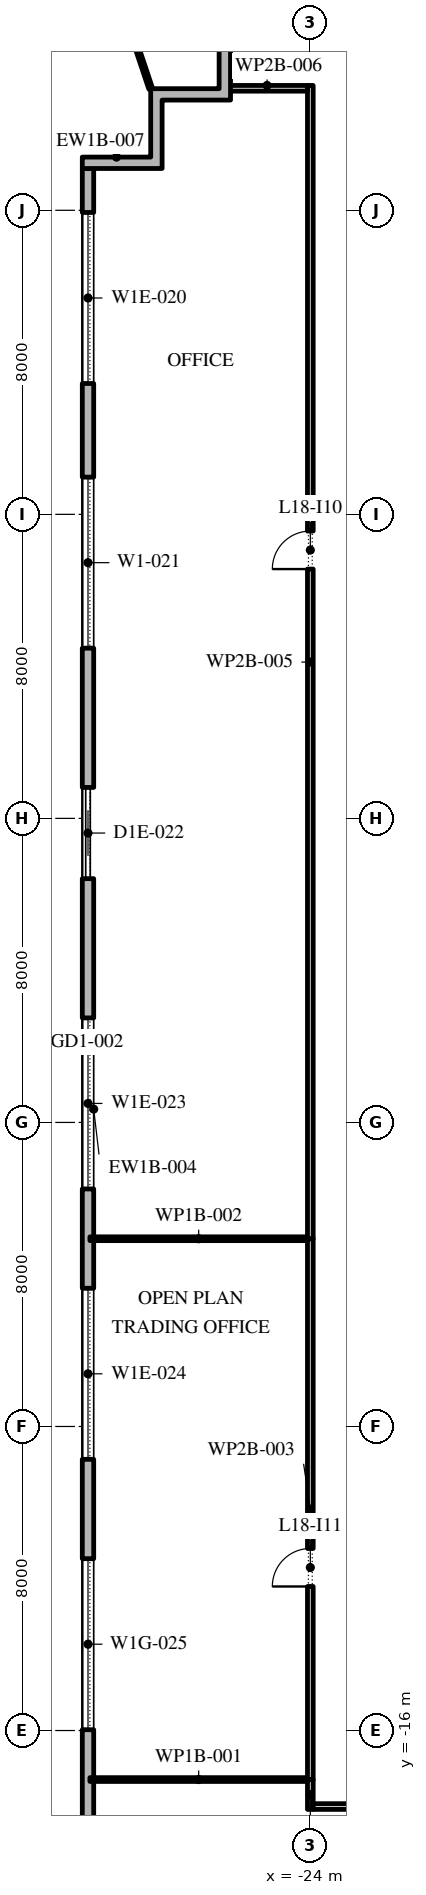
"""IFC4 building model, lengths in metres.
Left out: names, types, materials, properties, quantities, classifications, styles, units other than length and angle.
Written with IfcOpenShell. Run it as: python <this file> out.ifc"""

import sys

from ifc_helpers import new_model, si_unit, direction, frame, frame_2d, origin, place, context, subcontext, project, spatial, polyline, rectangle, outline, extrude, element, fill, save


model = new_model("IFC4")
c1 = context("Model", 3, precision=1e-05, world=origin(), true_north=direction((0.0, 1.0)))
c2 = subcontext(c1, "Body", "Model", "MODEL_VIEW")
j1 = project(units=[si_unit("LENGTHUNIT", "METRE"), si_unit("PLANEANGLEUNIT", "RADIAN")], contexts=[c1])
p1 = place(None, origin())
s1 = spatial("IfcSite", under=j1, at=p1, CompositionType="ELEMENT")
p2 = place(p1, origin())
s2 = spatial("IfcBuilding", under=s1, at=p2, CompositionType="ELEMENT")
p3 = place(p2, frame((0.0, 0.0, 85.8)))
s3 = spatial("IfcBuildingStorey", under=s2, at=p3, CompositionType="ELEMENT", Elevation=85.8)
p4 = place(p3, frame((-29.85, 25.1, 0.0), z_axis=(0.0, 0.0, 1.0), x_axis=(0.0, -1.0, 0.0)))
e1 = element("IfcWall", 1, at=p4, inside=s3, PredefinedType="STANDARD", context=c2, shape_type="SweptSolid", body=[
    extrude(rectangle(XDim=49.5, YDim=0.3, at=frame_2d((24.75, 0.0))), origin(), (0.0, 0.0, 1.0), 3.95),
])
p5 = place(p4, frame((1.157, 0.0, 0.45)))
e2 = element("IfcOpeningElement", 2, at=p5, cuts=e1, PredefinedType="OPENING", context=c2, shape_type="SweptSolid", body=[
    extrude(rectangle(XDim=4.5, YDim=2.825, at=frame_2d((2.25, 1.413))), frame((0.0, 0.16, 0.0), z_axis=(0.0, -1.0, 0.0), x_axis=(1.0, 0.0, 0.0)), (0.0, 0.0, 1.0), 0.32),
])
p6 = place(p4, frame((8.121, 0.0, 0.45)))
e3 = element("IfcOpeningElement", 3, at=p6, cuts=e1, PredefinedType="OPENING", context=c2, shape_type="SweptSolid", body=[
    extrude(rectangle(XDim=4.5, YDim=3.05, at=frame_2d((2.25, 1.525))), frame((0.0, 0.16, 0.0), z_axis=(0.0, -1.0, 0.0), x_axis=(1.0, 0.0, 0.0)), (0.0, 0.0, 1.0), 0.32),
])
p7 = place(p4, frame((16.286, 0.0, 0.0)))
e4 = element("IfcOpeningElement", 4, at=p7, cuts=e1, PredefinedType="OPENING", context=c2, shape_type="SweptSolid", body=[
    extrude(rectangle(XDim=2.4, YDim=3.275, at=frame_2d((1.2, 1.637))), frame((0.0, 0.16, 0.0), z_axis=(0.0, -1.0, 0.0), x_axis=(1.0, 0.0, 0.0)), (0.0, 0.0, 1.0), 0.32),
])
p8 = place(p4, frame((22.35, 0.0, 0.45)))
e5 = element("IfcOpeningElement", 5, at=p8, cuts=e1, PredefinedType="OPENING", context=c2, shape_type="SweptSolid", body=[
    extrude(rectangle(XDim=4.5, YDim=2.825, at=frame_2d((2.25, 1.413))), frame((0.0, 0.16, 0.0), z_axis=(0.0, -1.0, 0.0), x_axis=(1.0, 0.0, 0.0)), (0.0, 0.0, 1.0), 0.32),
])
p9 = place(p4, frame((29.464, 0.0, 0.45)))
e6 = element("IfcOpeningElement", 6, at=p9, cuts=e1, PredefinedType="OPENING", context=c2, shape_type="SweptSolid", body=[
    extrude(rectangle(XDim=4.5, YDim=2.825, at=frame_2d((2.25, 1.413))), frame((0.0, 0.16, 0.0), z_axis=(0.0, -1.0, 0.0), x_axis=(1.0, 0.0, 0.0)), (0.0, 0.0, 1.0), 0.32),
])
p10 = place(p4, frame((36.579, 0.0, 0.45)))
e7 = element("IfcOpeningElement", 7, at=p10, cuts=e1, PredefinedType="OPENING", context=c2, shape_type="SweptSolid", body=[
    extrude(rectangle(XDim=4.5, YDim=2.775, at=frame_2d((2.25, 1.387))), frame((0.0, 0.16, 0.0), z_axis=(0.0, -1.0, 0.0), x_axis=(1.0, 0.0, 0.0)), (0.0, 0.0, 1.0), 0.32),
])
p11 = place(p4, frame((44.743, 0.0, 0.0)))
e8 = element("IfcOpeningElement", 8, at=p11, cuts=e1, PredefinedType="OPENING", context=c2, shape_type="SweptSolid", body=[
    extrude(rectangle(XDim=2.4, YDim=3.5, at=frame_2d((1.2, 1.75))), frame((0.0, 0.16, 0.0), z_axis=(0.0, -1.0, 0.0), x_axis=(1.0, 0.0, 0.0)), (0.0, 0.0, 1.0), 0.32),
])
p12 = place(p3, origin())
e9 = element("IfcWall", 9, at=p12, inside=s3, PredefinedType="STANDARD", context=c2, shape_type="SweptSolid", body=[
    extrude(outline(polyline([(-28.2, 25.4), (-28.2, 27.2), (-26.4, 27.2), (-26.4, 28.7), (-26.1, 28.7), (-26.1, 26.9), (-27.9, 26.9), (-27.9, 25.1), (-30.0, 25.1), (-30.0, 25.4), (-28.2, 25.4)])), origin(), (0.0, 0.0, 1.0), 3.95),
])
p13 = place(p3, frame((-28.2, 27.2, -0.05), z_axis=(0.0, 0.0, 1.0), x_axis=(-0.318381156621, 0.94796278361, 0.0)))
e10 = element("IfcWall", 10, at=p13, inside=s3, PredefinedType="STANDARD", context=c2, shape_type="SweptSolid", body=[
    extrude(rectangle(XDim=6.528, YDim=0.1, at=frame_2d((3.264, 0.0))), origin(), (0.0, 0.0, 1.0), 4.0),
])
p14 = place(p3, frame((-24.0, -18.075, 0.0), z_axis=(0.0, 0.0, 1.0), x_axis=(0.0, 1.0, 0.0)))
e11 = element("IfcWall", 11, at=p14, inside=s3, PredefinedType="PARTITIONING", context=c2, shape_type="SweptSolid", body=[
    extrude(rectangle(XDim=0.785, YDim=0.15, at=frame_2d((0.393, 0.0))), origin(), (0.0, 0.0, 1.0), 3.95),
])
p15 = place(p3, frame((-24.075, -17.29, 0.0), z_axis=(0.0, 0.0, 1.0), x_axis=(-1.0, 0.0, 0.0)))
e12 = element("IfcWall", 12, at=p15, inside=s3, PredefinedType="PARTITIONING", context=c2, shape_type="SweptSolid", body=[
    extrude(rectangle(XDim=5.725, YDim=0.1, at=frame_2d((2.863, 0.0))), origin(), (0.0, 0.0, 1.0), 3.95),
])
p16 = place(p3, frame((-24.0, -17.29, 0.0), z_axis=(0.0, 0.0, 1.0), x_axis=(0.0, 1.0, 0.0)))
e13 = element("IfcWall", 13, at=p16, inside=s3, PredefinedType="PARTITIONING", context=c2, shape_type="SweptSolid", body=[
    extrude(rectangle(XDim=14.23, YDim=0.15, at=frame_2d((7.115, 0.0))), origin(), (0.0, 0.0, 1.0), 3.95),
])
p17 = place(p16, frame((5.08, 0.0, 0.0)))
e14 = element("IfcOpeningElement", 14, at=p17, cuts=e13, PredefinedType="OPENING", context=c2, shape_type="SweptSolid", body=[
    extrude(rectangle(XDim=1.0, YDim=2.1, at=frame_2d((0.5, 1.05))), frame((0.0, 0.085, 0.0), z_axis=(0.0, -1.0, 0.0), x_axis=(1.0, 0.0, 0.0)), (0.0, 0.0, 1.0), 0.17),
])
p18 = place(p3, frame((-24.075, -3.06, 0.0), z_axis=(0.0, 0.0, 1.0), x_axis=(-1.0, 0.0, 0.0)))
e15 = element("IfcWall", 15, at=p18, inside=s3, PredefinedType="PARTITIONING", context=c2, shape_type="SweptSolid", body=[
    extrude(rectangle(XDim=5.725, YDim=0.1, at=frame_2d((2.863, 0.0))), origin(), (0.0, 0.0, 1.0), 3.95),
])
p19 = place(p3, frame((-24.0, -3.06, 0.0), z_axis=(0.0, 0.0, 1.0), x_axis=(0.0, 1.0, 0.0)))
e16 = element("IfcWall", 16, at=p19, inside=s3, PredefinedType="PARTITIONING", context=c2, shape_type="SweptSolid", body=[
    extrude(rectangle(XDim=30.345, YDim=0.15, at=frame_2d((15.172, 0.0))), origin(), (0.0, 0.0, 1.0), 3.95),
])
p20 = place(p19, frame((17.62, 0.0, 0.0)))
e17 = element("IfcOpeningElement", 17, at=p20, cuts=e16, PredefinedType="OPENING", context=c2, shape_type="SweptSolid", body=[
    extrude(rectangle(XDim=1.0, YDim=2.1, at=frame_2d((0.5, 1.05))), frame((0.0, 0.085, 0.0), z_axis=(0.0, -1.0, 0.0), x_axis=(1.0, 0.0, 0.0)), (0.0, 0.0, 1.0), 0.17),
])
p21 = place(p3, frame((-24.075, 27.21, 0.0), z_axis=(0.0, 0.0, 1.0), x_axis=(-1.0, 0.0, 0.0)))
e18 = element("IfcWall", 18, at=p21, inside=s3, PredefinedType="PARTITIONING", context=c2, shape_type="SweptSolid", body=[
    extrude(rectangle(XDim=2.125, YDim=0.15, at=frame_2d((1.062, 0.0))), origin(), (0.0, 0.0, 1.0), 3.95),
])
p22 = place(p3, frame((-8.85, -18.0, 0.0), z_axis=(0.0, 0.0, 1.0), x_axis=(-1.0, 0.0, 0.0)))
e19 = element("IfcWall", 19, at=p22, inside=s3, PredefinedType="PARTITIONING", context=c2, shape_type="SweptSolid", body=[
    extrude(rectangle(XDim=15.075, YDim=0.15, at=frame_2d((7.538, 0.0))), origin(), (0.0, 0.0, 1.0), 3.95),
])
p23 = place(p22, frame((6.7, 0.0, 0.0)))
e20 = element("IfcOpeningElement", 20, at=p23, cuts=e19, PredefinedType="OPENING", context=c2, shape_type="SweptSolid", body=[
    extrude(rectangle(XDim=1.8, YDim=2.1, at=frame_2d((0.9, 1.05))), frame((0.0, 0.085, 0.0), z_axis=(0.0, -1.0, 0.0), x_axis=(1.0, 0.0, 0.0)), (0.0, 0.0, 1.0), 0.17),
])
p24 = place(p5, origin())
e21 = element("IfcWindow", 21, at=p24, inside=s3, PartitioningType="DOUBLE_PANEL_VERTICAL", PredefinedType="WINDOW", context=c2, shape_type="SweptSolid", body=[
    extrude(rectangle(XDim=4.5, YDim=2.825, at=frame_2d((2.25, 1.413))), frame((0.0, 0.03, 0.0), z_axis=(0.0, -1.0, 0.0), x_axis=(1.0, 0.0, 0.0)), (0.0, 0.0, 1.0), 0.06),
])
fill(e2, e21)
p25 = place(p6, origin())
e22 = element("IfcWindow", 22, at=p25, inside=s3, PartitioningType="DOUBLE_PANEL_VERTICAL", PredefinedType="WINDOW", context=c2, shape_type="SweptSolid", body=[
    extrude(rectangle(XDim=4.5, YDim=3.05, at=frame_2d((2.25, 1.525))), frame((0.0, 0.03, 0.0), z_axis=(0.0, -1.0, 0.0), x_axis=(1.0, 0.0, 0.0)), (0.0, 0.0, 1.0), 0.06),
])
fill(e3, e22)
p26 = place(p7, origin())
e23 = element("IfcDoor", 23, at=p26, inside=s3, OperationType="DOUBLE_DOOR_SLIDING", PredefinedType="DOOR", context=c2, shape_type="SweptSolid", body=[
    extrude(rectangle(XDim=2.4, YDim=3.275, at=frame_2d((1.2, 1.637))), frame((0.0, 0.025, 0.0), z_axis=(0.0, -1.0, 0.0), x_axis=(1.0, 0.0, 0.0)), (0.0, 0.0, 1.0), 0.05),
])
fill(e4, e23)
p27 = place(p8, origin())
e24 = element("IfcWindow", 24, at=p27, inside=s3, PartitioningType="DOUBLE_PANEL_VERTICAL", PredefinedType="WINDOW", context=c2, shape_type="SweptSolid", body=[
    extrude(rectangle(XDim=4.5, YDim=2.825, at=frame_2d((2.25, 1.413))), frame((0.0, 0.03, 0.0), z_axis=(0.0, -1.0, 0.0), x_axis=(1.0, 0.0, 0.0)), (0.0, 0.0, 1.0), 0.06),
])
fill(e5, e24)
p28 = place(p9, origin())
e25 = element("IfcWindow", 25, at=p28, inside=s3, PartitioningType="DOUBLE_PANEL_VERTICAL", PredefinedType="WINDOW", context=c2, shape_type="SweptSolid", body=[
    extrude(rectangle(XDim=4.5, YDim=2.825, at=frame_2d((2.25, 1.413))), frame((0.0, 0.03, 0.0), z_axis=(0.0, -1.0, 0.0), x_axis=(1.0, 0.0, 0.0)), (0.0, 0.0, 1.0), 0.06),
])
fill(e6, e25)
p29 = place(p10, origin())
e26 = element("IfcWindow", 26, at=p29, inside=s3, PartitioningType="DOUBLE_PANEL_VERTICAL", PredefinedType="WINDOW", context=c2, shape_type="SweptSolid", body=[
    extrude(rectangle(XDim=4.5, YDim=2.775, at=frame_2d((2.25, 1.387))), frame((0.0, 0.03, 0.0), z_axis=(0.0, -1.0, 0.0), x_axis=(1.0, 0.0, 0.0)), (0.0, 0.0, 1.0), 0.06),
])
fill(e7, e26)
p30 = place(p20, origin())
e27 = element("IfcDoor", 27, at=p30, inside=s3, OperationType="SINGLE_SWING_RIGHT", PredefinedType="DOOR", context=c2, shape_type="SweptSolid", body=[
    extrude(rectangle(XDim=1.0, YDim=2.1, at=frame_2d((0.5, 1.05))), frame((0.0, 0.025, 0.0), z_axis=(0.0, -1.0, 0.0), x_axis=(1.0, 0.0, 0.0)), (0.0, 0.0, 1.0), 0.05),
])
fill(e17, e27)
p31 = place(p17, origin())
e28 = element("IfcDoor", 28, at=p31, inside=s3, OperationType="SINGLE_SWING_RIGHT", PredefinedType="DOOR", context=c2, shape_type="SweptSolid", body=[
    extrude(rectangle(XDim=1.0, YDim=2.1, at=frame_2d((0.5, 1.05))), frame((0.0, 0.025, 0.0), z_axis=(0.0, -1.0, 0.0), x_axis=(1.0, 0.0, 0.0)), (0.0, 0.0, 1.0), 0.05),
])
fill(e14, e28)
save(model, sys.argv[1])
